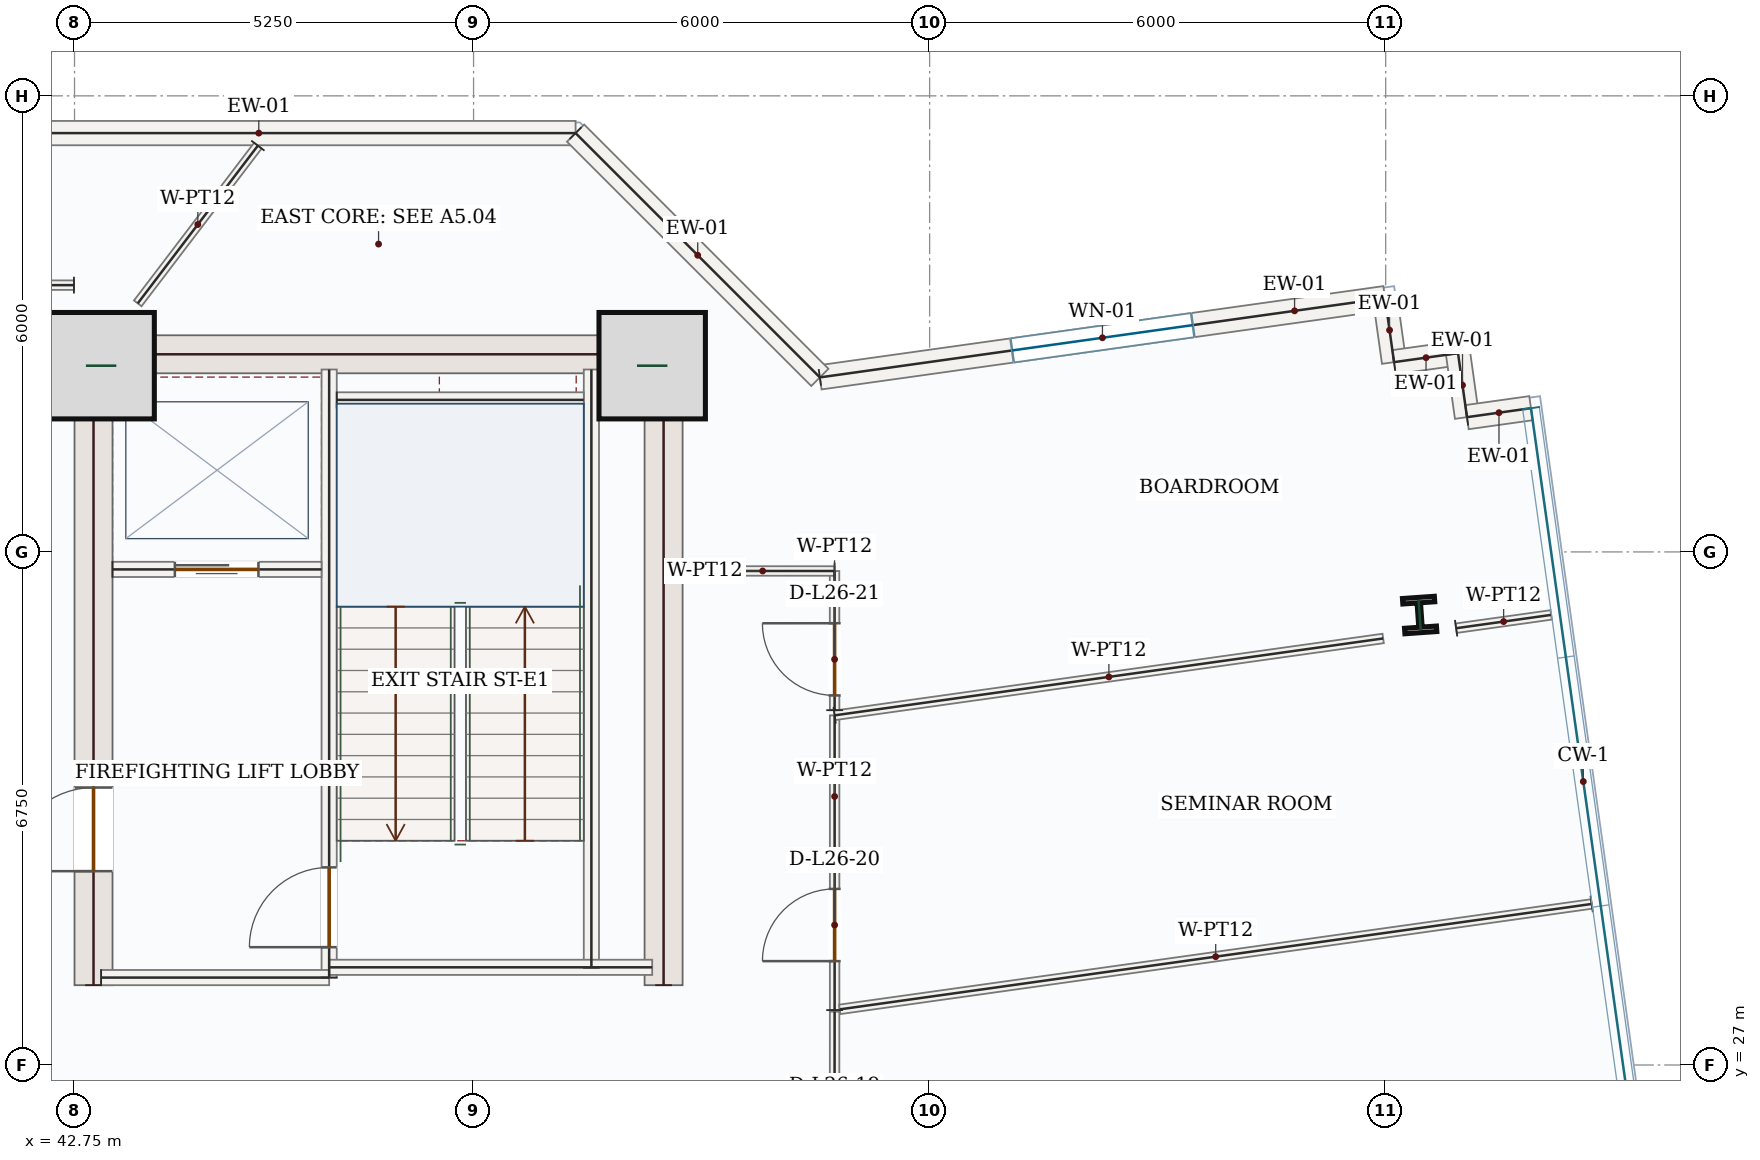
"""IFC4 building model, lengths in metres.
Left out: names, types, materials, properties, quantities, classifications, styles, units other than length and angle.
Written with IfcOpenShell. Run it as: python <this file> out.ifc"""

import sys

from ifc_helpers import new_model, si_unit, direction, frame, frame_2d, origin, origin_2d, place, context, subcontext, project, spatial, rectangle, i_section, extrude, source, transform, mapped, element, fill, save


model = new_model("IFC4")
c1 = context("Model", 3, precision=1e-05, world=origin(), true_north=direction((0.0, 1.0)))
c2 = subcontext(c1, "Body", "Model", "MODEL_VIEW")
j1 = project(units=[si_unit("LENGTHUNIT", "METRE"), si_unit("PLANEANGLEUNIT", "RADIAN")], contexts=[c1])
p1 = place(None, origin())
s1 = spatial("IfcSite", under=j1, at=p1, CompositionType="ELEMENT")
p2 = place(p1, origin())
s2 = spatial("IfcBuilding", under=s1, at=p2, CompositionType="ELEMENT")
p3 = place(p2, frame((0.0, 0.0, 117.3)))
s3 = spatial("IfcBuildingStorey", under=s2, at=p3, CompositionType="ELEMENT", Elevation=117.3)
p4 = place(p3, frame((43.0, 28.05, 0.0), z_axis=(0.0, 0.0, 1.0), x_axis=(0.0, 1.0, 0.0)))
e1 = element("IfcWall", 1, at=p4, inside=s3, PredefinedType="SHEAR", context=c2, shape_type="SweptSolid", body=[
    extrude(rectangle(XDim=8.55, YDim=0.5, at=frame_2d((4.275, 0.0))), origin(), (0.0, 0.0, 1.0), 3.95),
])
p5 = place(p4, frame((1.5, 0.0, 0.0)))
e2 = element("IfcOpeningElement", 2, at=p5, cuts=e1, PredefinedType="OPENING", context=c2, shape_type="SweptSolid", body=[
    extrude(rectangle(XDim=1.1, YDim=2.2, at=frame_2d((0.55, 1.1))), frame((0.0, 0.26, 0.0), z_axis=(0.0, -1.0, 0.0), x_axis=(1.0, 0.0, 0.0)), (0.0, 0.0, 1.0), 0.52),
])
m1 = source(origin(), c2, "Body", "SweptSolid", [
    extrude(rectangle(XDim=8.55, YDim=0.5, at=frame_2d((4.275, 0.0))), origin(), (0.0, 0.0, 1.0), 3.95),
])
p6 = place(p3, frame((50.5, 28.05, 0.0), z_axis=(0.0, 0.0, 1.0), x_axis=(0.0, 1.0, 0.0)))
e3 = element("IfcWall", 3, at=p6, inside=s3, PredefinedType="SHEAR", context=c2, shape_type="MappedRepresentation", body=[
    mapped(m1, transform((0.0, 0.0, 0.0), x_axis=(1.0, 0.0, 0.0), y_axis=(0.0, 1.0, 0.0), z_axis=(0.0, 0.0, 1.0), scale=1.0)),
])
m2 = source(origin(), c2, "Body", "SweptSolid", [
    extrude(rectangle(XDim=7.0, YDim=0.5, at=frame_2d((3.5, 0.0))), origin(), (0.0, 0.0, 1.0), 3.95),
])
p7 = place(p3, frame((43.25, 36.35, 0.0), z_axis=(0.0, 0.0, 1.0), x_axis=(1.0, 0.0, 0.0)))
e4 = element("IfcWall", 4, at=p7, inside=s3, PredefinedType="SHEAR", context=c2, shape_type="MappedRepresentation", body=[
    mapped(m2, transform((0.0, 0.0, 0.0), x_axis=(1.0, 0.0, 0.0), y_axis=(0.0, 1.0, 0.0), z_axis=(0.0, 0.0, 1.0), scale=1.0)),
])
m3 = source(origin(), c2, "Body", "SweptSolid", [
    extrude(rectangle(XDim=1.4, YDim=1.4, at=origin_2d()), origin(), (0.0, 0.0, 1.0), 4.2),
])
for number, where, z_axis, x_axis in (
    (5, (43.1, 36.2, 0.0), (0.0, 0.0, 1.0), (1.0, 0.0, 0.0)),
    (6, (50.35, 36.2, 0.0), (0.0, 0.0, 1.0), (1.0, 0.0, 0.0)),
):
    element("IfcColumn", number, at=place(p3, frame(where, z_axis=z_axis, x_axis=x_axis)), inside=s3, PredefinedType="COLUMN", context=c2, shape_type="MappedRepresentation", body=[
        mapped(m3, transform((0.0, 0.0, 0.0), x_axis=(1.0, 0.0, 0.0), y_axis=(0.0, 1.0, 0.0), z_axis=(0.0, 0.0, 1.0), scale=1.0)),
    ])
m4 = source(origin(), c2, "Body", "SweptSolid", [
    extrude(i_section(OverallWidth=0.421, OverallDepth=0.465, WebThickness=0.045, FlangeThickness=0.073, FilletRadius=0.018, at=origin_2d()), origin(), (0.0, 0.0, 1.0), 4.2),
])
p8 = place(p3, frame((60.447, 32.92, 0.0), z_axis=(0.0, 0.0, 1.0), x_axis=(0.99756405026, 0.069756473744, 0.0)))
e7 = element("IfcColumn", 7, at=p8, inside=s3, PredefinedType="COLUMN", context=c2, shape_type="MappedRepresentation", body=[
    mapped(m4, transform((0.0, 0.0, 0.0), x_axis=(1.0, 0.0, 0.0), y_axis=(0.0, 1.0, 0.0), z_axis=(0.0, 0.0, 1.0), scale=1.0)),
])
p9 = place(p3, frame((52.556, 36.046, 0.0), z_axis=(0.0, 0.0, 1.0), x_axis=(0.990319321248, 0.138807931917, 0.0)))
e8 = element("IfcWall", 8, at=p9, inside=s3, PredefinedType="SOLIDWALL", context=c2, shape_type="SweptSolid", body=[
    extrude(rectangle(XDim=7.509, YDim=0.32, at=frame_2d((3.754, 0.0))), origin(), (0.0, 0.0, 1.0), 3.95),
])
p10 = place(p9, frame((2.554, 0.0, 0.85)))
e9 = element("IfcOpeningElement", 9, at=p10, cuts=e8, PredefinedType="OPENING", context=c2, shape_type="SweptSolid", body=[
    extrude(rectangle(XDim=2.4, YDim=1.8, at=frame_2d((1.2, 0.9))), frame((0.0, 0.17, 0.0), z_axis=(0.0, -1.0, 0.0), x_axis=(1.0, 0.0, 0.0)), (0.0, 0.0, 1.0), 0.34),
])
m5 = source(origin(), c2, "Body", "SweptSolid", [
    extrude(rectangle(XDim=0.85, YDim=0.32, at=frame_2d((0.425, 0.0))), origin(), (0.0, 0.0, 1.0), 3.95),
])
for number, where, z_axis, x_axis in (
    (10, (59.992, 37.088, 0.0), (0.0, 0.0, 1.0), (0.139, -0.99, 0.0)),
    (11, (60.11, 36.247, 0.0), (0.0, 0.0, 1.0), (0.99, 0.139, 0.0)),
):
    element("IfcWall", number, at=place(p3, frame(where, z_axis=z_axis, x_axis=x_axis)), inside=s3, PredefinedType="SOLIDWALL", context=c2, shape_type="MappedRepresentation", body=[
        mapped(m5, transform((0.0, 0.0, 0.0), x_axis=(1.0, 0.0, 0.0), y_axis=(0.0, 1.0, 0.0), z_axis=(0.0, 0.0, 1.0), scale=1.0)),
    ])
m6 = source(origin(), c2, "Body", "SweptSolid", [
    extrude(rectangle(XDim=0.85, YDim=0.32, at=frame_2d((0.425, 0.0))), origin(), (0.0, 0.0, 1.0), 3.95),
])
p11 = place(p3, frame((60.952, 36.365, 0.0), z_axis=(0.0, 0.0, 1.0), x_axis=(0.138766190202, -0.990325171071, 0.0)))
e12 = element("IfcWall", 12, at=p11, inside=s3, PredefinedType="SOLIDWALL", context=c2, shape_type="MappedRepresentation", body=[
    mapped(m6, transform((0.0, 0.0, 0.0), x_axis=(1.0, 0.0, 0.0), y_axis=(0.0, 1.0, 0.0), z_axis=(0.0, 0.0, 1.0), scale=1.0)),
])
p12 = place(p3, frame((61.07, 35.523, 0.0), z_axis=(0.0, 0.0, 1.0), x_axis=(0.990330700987, 0.138726719425, 0.0)))
e13 = element("IfcWall", 13, at=p12, inside=s3, PredefinedType="SOLIDWALL", context=c2, shape_type="MappedRepresentation", body=[
    mapped(m5, transform((0.0, 0.0, 0.0), x_axis=(1.0, 0.0, 0.0), y_axis=(0.0, 1.0, 0.0), z_axis=(0.0, 0.0, 1.0), scale=1.0)),
])
m7 = source(origin(), c2, "Body", "SweptSolid", [
    extrude(rectangle(XDim=8.335, YDim=0.32, at=frame_2d((4.168, 0.0))), origin(), (0.0, 0.0, 1.0), 3.95),
])
p13 = place(p3, frame((41.007, 39.26, 0.0), z_axis=(0.0, 0.0, 1.0), x_axis=(1.0, 0.0, 0.0)))
e14 = element("IfcWall", 14, at=p13, inside=s3, PredefinedType="SOLIDWALL", context=c2, shape_type="MappedRepresentation", body=[
    mapped(m7, transform((0.0, 0.0, 0.0), x_axis=(1.0, 0.0, 0.0), y_axis=(0.0, 1.0, 0.0), z_axis=(0.0, 0.0, 1.0), scale=1.0)),
])
m8 = source(origin(), c2, "Body", "SweptSolid", [
    extrude(rectangle(XDim=4.545, YDim=0.32, at=frame_2d((2.272, 0.0))), origin(), (0.0, 0.0, 1.0), 3.95),
])
p14 = place(p3, frame((49.342, 39.26, 0.0), z_axis=(0.0, 0.0, 1.0), x_axis=(0.707106781187, -0.707106781187, 0.0)))
e15 = element("IfcWall", 15, at=p14, inside=s3, PredefinedType="SOLIDWALL", context=c2, shape_type="MappedRepresentation", body=[
    mapped(m8, transform((0.0, 0.0, 0.0), x_axis=(1.0, 0.0, 0.0), y_axis=(0.0, 1.0, 0.0), z_axis=(0.0, 0.0, 1.0), scale=1.0)),
])
m9 = source(origin(), c2, "Body", "SweptSolid", [
    extrude(rectangle(XDim=7.87, YDim=0.2, at=frame_2d((3.935, 0.0))), origin(), (0.0, 0.0, 1.0), 3.95),
])
p15 = place(p3, frame((49.55, 28.28, 0.0), z_axis=(0.0, 0.0, 1.0), x_axis=(0.0, 1.0, 0.0)))
e16 = element("IfcWall", 16, at=p15, inside=s3, PredefinedType="SOLIDWALL", context=c2, shape_type="MappedRepresentation", body=[
    mapped(m9, transform((0.0, 0.0, 0.0), x_axis=(1.0, 0.0, 0.0), y_axis=(0.0, 1.0, 0.0), z_axis=(0.0, 0.0, 1.0), scale=1.0)),
])
p16 = place(p3, frame((46.1, 28.15, 0.0), z_axis=(0.0, 0.0, 1.0), x_axis=(0.0, 1.0, 0.0)))
e17 = element("IfcWall", 17, at=p16, inside=s3, PredefinedType="SOLIDWALL", context=c2, shape_type="SweptSolid", body=[
    extrude(rectangle(XDim=8.0, YDim=0.2, at=frame_2d((4.0, 0.0))), origin(), (0.0, 0.0, 1.0), 3.95),
])
p17 = place(p16, frame((0.4, 0.0, 0.0)))
e18 = element("IfcOpeningElement", 18, at=p17, cuts=e17, PredefinedType="OPENING", context=c2, shape_type="SweptSolid", body=[
    extrude(rectangle(XDim=1.05, YDim=2.15, at=frame_2d((0.525, 1.075))), frame((0.0, 0.11, 0.0), z_axis=(0.0, -1.0, 0.0), x_axis=(1.0, 0.0, 0.0)), (0.0, 0.0, 1.0), 0.22),
])
m10 = source(origin(), c2, "Body", "SweptSolid", [
    extrude(rectangle(XDim=3.0, YDim=0.2, at=frame_2d((1.5, 0.0))), origin(), (0.0, 0.0, 1.0), 3.95),
])
p18 = place(p3, frame((43.1, 28.15, 0.0), z_axis=(0.0, 0.0, 1.0), x_axis=(1.0, 0.0, 0.0)))
e19 = element("IfcWall", 19, at=p18, inside=s3, PredefinedType="SOLIDWALL", context=c2, shape_type="MappedRepresentation", body=[
    mapped(m10, transform((0.0, 0.0, 0.0), x_axis=(1.0, 0.0, 0.0), y_axis=(0.0, 1.0, 0.0), z_axis=(0.0, 0.0, 1.0), scale=1.0)),
])
m11 = source(origin(), c2, "Body", "SweptSolid", [
    extrude(rectangle(XDim=4.25, YDim=0.2, at=frame_2d((2.125, 0.0))), origin(), (0.0, 0.0, 1.0), 3.95),
])
p19 = place(p3, frame((46.1, 28.285, 0.0), z_axis=(0.0, 0.0, 1.0), x_axis=(1.0, 0.0, 0.0)))
e20 = element("IfcWall", 20, at=p19, inside=s3, PredefinedType="SOLIDWALL", context=c2, shape_type="MappedRepresentation", body=[
    mapped(m11, transform((0.0, 0.0, 0.0), x_axis=(1.0, 0.0, 0.0), y_axis=(0.0, 1.0, 0.0), z_axis=(0.0, 0.0, 1.0), scale=1.0)),
])
m12 = source(origin(), c2, "Body", "SweptSolid", [
    extrude(rectangle(XDim=3.25, YDim=0.2, at=frame_2d((1.625, 0.0))), origin(), (0.0, 0.0, 1.0), 3.95),
])
p20 = place(p3, frame((46.2, 35.75, 0.0), z_axis=(0.0, 0.0, 1.0), x_axis=(1.0, 0.0, 0.0)))
e21 = element("IfcWall", 21, at=p20, inside=s3, PredefinedType="SOLIDWALL", context=c2, shape_type="MappedRepresentation", body=[
    mapped(m12, transform((0.0, 0.0, 0.0), x_axis=(1.0, 0.0, 0.0), y_axis=(0.0, 1.0, 0.0), z_axis=(0.0, 0.0, 1.0), scale=1.0)),
])
p21 = place(p3, frame((43.25, 33.52, 0.0), z_axis=(0.0, 0.0, 1.0), x_axis=(1.0, 0.0, 0.0)))
e22 = element("IfcWall", 22, at=p21, inside=s3, PredefinedType="SOLIDWALL", context=c2, shape_type="SweptSolid", body=[
    extrude(rectangle(XDim=2.75, YDim=0.2, at=frame_2d((1.375, 0.0))), origin(), (0.0, 0.0, 1.0), 3.95),
])
p22 = place(p21, frame((0.82, 0.0, 0.0)))
e23 = element("IfcOpeningElement", 23, at=p22, cuts=e22, PredefinedType="OPENING", context=c2, shape_type="SweptSolid", body=[
    extrude(rectangle(XDim=1.1, YDim=2.15, at=frame_2d((0.55, 1.075))), frame((0.0, 0.11, 0.0), z_axis=(0.0, -1.0, 0.0), x_axis=(1.0, 0.0, 0.0)), (0.0, 0.0, 1.0), 0.22),
])
p23 = place(p3, frame((52.75, 27.722, 0.0), z_axis=(0.0, 0.0, 1.0), x_axis=(0.0, 1.0, 0.0)))
e24 = element("IfcWall", 24, at=p23, inside=s3, PredefinedType="PARTITIONING", context=c2, shape_type="SweptSolid", body=[
    extrude(rectangle(XDim=3.877, YDim=0.125, at=frame_2d((1.939, 0.0))), origin(), (0.0, 0.0, 1.0), 3.95),
])
p24 = place(p23, frame((0.644, 0.0, 0.0)))
e25 = element("IfcOpeningElement", 25, at=p24, cuts=e24, PredefinedType="OPENING", context=c2, shape_type="SweptSolid", body=[
    extrude(rectangle(XDim=0.95, YDim=2.15, at=frame_2d((0.475, 1.075))), frame((0.0, 0.073, 0.0), z_axis=(0.0, -1.0, 0.0), x_axis=(1.0, 0.0, 0.0)), (0.0, 0.0, 1.0), 0.145),
])
m13 = source(origin(), c2, "Body", "SweptSolid", [
    extrude(rectangle(XDim=7.287, YDim=0.125, at=frame_2d((3.644, 0.0))), origin(), (0.0, 0.0, 1.0), 3.95),
])
p25 = place(p3, frame((52.75, 31.6, 0.0), z_axis=(0.0, 0.0, 1.0), x_axis=(0.990314677425, 0.138841059045, 0.0)))
e26 = element("IfcWall", 26, at=p25, inside=s3, PredefinedType="PARTITIONING", context=c2, shape_type="MappedRepresentation", body=[
    mapped(m13, transform((0.0, 0.0, 0.0), x_axis=(1.0, 0.0, 0.0), y_axis=(0.0, 1.0, 0.0), z_axis=(0.0, 0.0, 1.0), scale=1.0)),
])
m14 = source(origin(), c2, "Body", "SweptSolid", [
    extrude(rectangle(XDim=1.262, YDim=0.125, at=frame_2d((0.631, 0.0))), origin(), (0.0, 0.0, 1.0), 3.95),
])
p26 = place(p3, frame((60.927, 32.746, 0.0), z_axis=(0.0, 0.0, 1.0), x_axis=(0.990309850619, 0.138875482958, 0.0)))
e27 = element("IfcWall", 27, at=p26, inside=s3, PredefinedType="PARTITIONING", context=c2, shape_type="MappedRepresentation", body=[
    mapped(m14, transform((0.0, 0.0, 0.0), x_axis=(1.0, 0.0, 0.0), y_axis=(0.0, 1.0, 0.0), z_axis=(0.0, 0.0, 1.0), scale=1.0)),
])
m15 = source(origin(), c2, "Body", "SweptSolid", [
    extrude(rectangle(XDim=9.989, YDim=0.125, at=frame_2d((4.994, 0.0))), origin(), (0.0, 0.0, 1.0), 3.95),
])
p27 = place(p3, frame((62.709, 29.118, 0.0), z_axis=(0.0, 0.0, 1.0), x_axis=(-0.990319987422, -0.138803179046, 0.0)))
e28 = element("IfcWall", 28, at=p27, inside=s3, PredefinedType="PARTITIONING", context=c2, shape_type="MappedRepresentation", body=[
    mapped(m15, transform((0.0, 0.0, 0.0), x_axis=(1.0, 0.0, 0.0), y_axis=(0.0, 1.0, 0.0), z_axis=(0.0, 0.0, 1.0), scale=1.0)),
])
p28 = place(p3, frame((52.745, 20.569, 0.0), z_axis=(0.0, 0.0, 1.0), x_axis=(0.000684485962, 0.999999765739, 0.0)))
e29 = element("IfcWall", 29, at=p28, inside=s3, PredefinedType="PARTITIONING", context=c2, shape_type="SweptSolid", body=[
    extrude(rectangle(XDim=7.134, YDim=0.125, at=frame_2d((3.567, 0.0))), origin(), (0.0, 0.0, 1.0), 3.95),
])
p29 = place(p28, frame((4.823, 0.0, 0.0)))
e30 = element("IfcOpeningElement", 30, at=p29, cuts=e29, PredefinedType="OPENING", context=c2, shape_type="SweptSolid", body=[
    extrude(rectangle(XDim=0.95, YDim=2.15, at=frame_2d((0.475, 1.075))), frame((0.0, 0.073, 0.0), z_axis=(0.0, -1.0, 0.0), x_axis=(1.0, 0.0, 0.0)), (0.0, 0.0, 1.0), 0.145),
])
p30 = place(p3, frame((42.742, 37.26, 0.0), z_axis=(0.0, 0.0, 1.0), x_axis=(-0.999999999302, 3.7359435e-05, 0.0)))
e31 = element("IfcWall", 31, at=p30, inside=s3, PredefinedType="PARTITIONING", context=c2, shape_type="SweptSolid", body=[
    extrude(rectangle(XDim=6.535, YDim=0.125, at=frame_2d((3.268, 0.0))), origin(), (0.0, 0.0, 1.0), 3.95),
])
p31 = place(p30, frame((4.356, 0.0, 0.0)))
e32 = element("IfcOpeningElement", 32, at=p31, cuts=e31, PredefinedType="OPENING", context=c2, shape_type="SweptSolid", body=[
    extrude(rectangle(XDim=0.95, YDim=2.15, at=frame_2d((0.475, 1.075))), frame((0.0, 0.073, 0.0), z_axis=(0.0, -1.0, 0.0), x_axis=(1.0, 0.0, 0.0)), (0.0, 0.0, 1.0), 0.145),
])
m16 = source(origin(), c2, "Body", "SweptSolid", [
    extrude(rectangle(XDim=2.608, YDim=0.125, at=frame_2d((1.304, 0.0))), origin(), (0.0, 0.0, 1.0), 3.95),
])
p32 = place(p3, frame((45.162, 39.095, 0.0), z_axis=(0.0, 0.0, 1.0), x_axis=(-0.605840128894, -0.795586411537, 0.0)))
e33 = element("IfcWall", 33, at=p32, inside=s3, PredefinedType="PARTITIONING", context=c2, shape_type="MappedRepresentation", body=[
    mapped(m16, transform((0.0, 0.0, 0.0), x_axis=(1.0, 0.0, 0.0), y_axis=(0.0, 1.0, 0.0), z_axis=(0.0, 0.0, 1.0), scale=1.0)),
])
p33 = place(p3, frame((52.75, 31.668, 0.0), z_axis=(0.0, 0.0, 1.0), x_axis=(-0.000533333257, 0.999999857778, 0.0)))
e34 = element("IfcWall", 34, at=p33, inside=s3, PredefinedType="PARTITIONING", context=c2, shape_type="SweptSolid", body=[
    extrude(rectangle(XDim=1.831, YDim=0.125, at=frame_2d((0.916, 0.0))), origin(), (0.0, 0.0, 1.0), 3.95),
])
p34 = place(p33, frame((0.194, 0.0, 0.0)))
e35 = element("IfcOpeningElement", 35, at=p34, cuts=e34, PredefinedType="OPENING", context=c2, shape_type="SweptSolid", body=[
    extrude(rectangle(XDim=0.95, YDim=2.15, at=frame_2d((0.475, 1.075))), frame((0.0, 0.073, 0.0), z_axis=(0.0, -1.0, 0.0), x_axis=(1.0, 0.0, 0.0)), (0.0, 0.0, 1.0), 0.145),
])
m17 = source(origin(), c2, "Body", "SweptSolid", [
    extrude(rectangle(XDim=1.891, YDim=0.125, at=frame_2d((0.946, 0.0))), origin(), (0.0, 0.0, 1.0), 3.95),
])
p35 = place(p3, frame((52.749, 33.499, 0.0), z_axis=(0.0, 0.0, 1.0), x_axis=(-0.99999992502, 0.000387246647, 0.0)))
e36 = element("IfcWall", 36, at=p35, inside=s3, PredefinedType="PARTITIONING", context=c2, shape_type="MappedRepresentation", body=[
    mapped(m17, transform((0.0, 0.0, 0.0), x_axis=(1.0, 0.0, 0.0), y_axis=(0.0, 1.0, 0.0), z_axis=(0.0, 0.0, 1.0), scale=1.0)),
])
m18 = source(origin(), c2, "Body", "SweptSolid", [
    extrude(rectangle(XDim=2.4, YDim=1.8, at=frame_2d((1.2, 0.9))), frame((0.0, 0.03, 0.0), z_axis=(0.0, -1.0, 0.0), x_axis=(1.0, 0.0, 0.0)), (0.0, 0.0, 1.0), 0.06),
])
p36 = place(p10, origin())
e37 = element("IfcWindow", 37, at=p36, inside=s3, PartitioningType="DOUBLE_PANEL_VERTICAL", PredefinedType="WINDOW", context=c2, shape_type="MappedRepresentation", body=[
    mapped(m18, transform((0.0, 0.0, 0.0), x_axis=(1.0, 0.0, 0.0), y_axis=(0.0, 1.0, 0.0), z_axis=(0.0, 0.0, 1.0), scale=1.0)),
])
fill(e9, e37)
m19 = source(origin(), c2, "Body", "SweptSolid", [
    extrude(rectangle(XDim=1.05, YDim=2.15, at=frame_2d((0.525, 1.075))), frame((0.0, 0.025, 0.0), z_axis=(0.0, -1.0, 0.0), x_axis=(1.0, 0.0, 0.0)), (0.0, 0.0, 1.0), 0.05),
])
p37 = place(p17, origin())
e38 = element("IfcDoor", 38, at=p37, inside=s3, OperationType="SINGLE_SWING_LEFT", PredefinedType="DOOR", context=c2, shape_type="MappedRepresentation", body=[
    mapped(m19, transform((0.0, 0.0, 0.0), x_axis=(1.0, 0.0, 0.0), y_axis=(0.0, 1.0, 0.0), z_axis=(0.0, 0.0, 1.0), scale=1.0)),
])
fill(e18, e38)
m20 = source(origin(), c2, "Body", "SweptSolid", [
    extrude(rectangle(XDim=1.1, YDim=2.15, at=frame_2d((0.55, 1.075))), frame((0.0, 0.025, 0.0), z_axis=(0.0, -1.0, 0.0), x_axis=(1.0, 0.0, 0.0)), (0.0, 0.0, 1.0), 0.05),
])
p38 = place(p22, origin())
e39 = element("IfcDoor", 39, at=p38, inside=s3, OperationType="DOUBLE_DOOR_SLIDING", PredefinedType="DOOR", context=c2, shape_type="MappedRepresentation", body=[
    mapped(m20, transform((0.0, 0.0, 0.0), x_axis=(1.0, 0.0, 0.0), y_axis=(0.0, 1.0, 0.0), z_axis=(0.0, 0.0, 1.0), scale=1.0)),
])
fill(e23, e39)
m21 = source(origin(), c2, "Body", "SweptSolid", [
    extrude(rectangle(XDim=1.1, YDim=2.2, at=frame_2d((0.55, 1.1))), frame((0.0, 0.025, 0.0), z_axis=(0.0, -1.0, 0.0), x_axis=(1.0, 0.0, 0.0)), (0.0, 0.0, 1.0), 0.05),
])
p39 = place(p5, origin())
e40 = element("IfcDoor", 40, at=p39, inside=s3, OperationType="SINGLE_SWING_LEFT", PredefinedType="DOOR", context=c2, shape_type="MappedRepresentation", body=[
    mapped(m21, transform((0.0, 0.0, 0.0), x_axis=(1.0, 0.0, 0.0), y_axis=(0.0, 1.0, 0.0), z_axis=(0.0, 0.0, 1.0), scale=1.0)),
])
fill(e2, e40)
m22 = source(origin(), c2, "Body", "SweptSolid", [
    extrude(rectangle(XDim=0.95, YDim=2.15, at=frame_2d((0.475, 1.075))), frame((0.0, 0.025, 0.0), z_axis=(0.0, -1.0, 0.0), x_axis=(1.0, 0.0, 0.0)), (0.0, 0.0, 1.0), 0.05),
])
p40 = place(p24, origin())
e41 = element("IfcDoor", 41, at=p40, inside=s3, OperationType="SINGLE_SWING_LEFT", PredefinedType="DOOR", context=c2, shape_type="MappedRepresentation", body=[
    mapped(m22, transform((0.0, 0.0, 0.0), x_axis=(1.0, 0.0, 0.0), y_axis=(0.0, 1.0, 0.0), z_axis=(0.0, 0.0, 1.0), scale=1.0)),
])
fill(e25, e41)
p41 = place(p34, origin())
e42 = element("IfcDoor", 42, at=p41, inside=s3, OperationType="SINGLE_SWING_RIGHT", PredefinedType="DOOR", context=c2, shape_type="MappedRepresentation", body=[
    mapped(m22, transform((0.0, 0.0, 0.0), x_axis=(1.0, 0.0, 0.0), y_axis=(0.0, 1.0, 0.0), z_axis=(0.0, 0.0, 1.0), scale=1.0)),
])
fill(e35, e42)
save(model, sys.argv[1])
